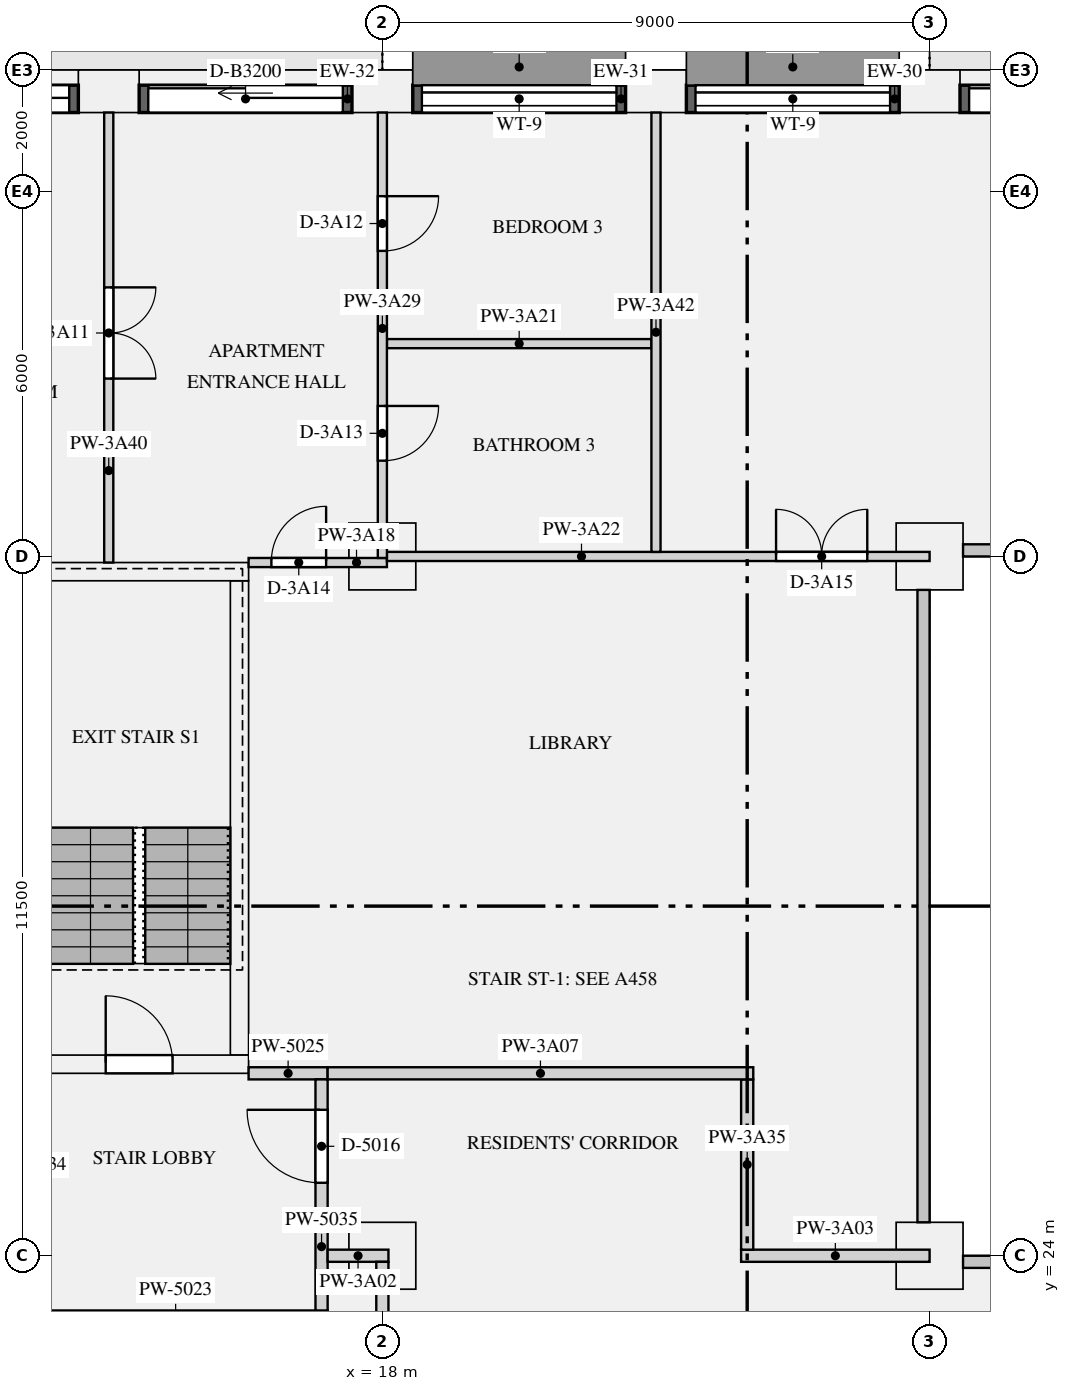
"""IFC4 building model, lengths in metres.
Left out: names, types, materials, properties, quantities, classifications, styles, units other than length and angle.
Written with IfcOpenShell. Run it as: python <this file> out.ifc"""

import sys

from ifc_helpers import new_model, si_unit, direction, frame, frame_2d, origin, origin_2d, place, context, subcontext, project, spatial, rectangle, extrude, element, fill, save


model = new_model("IFC4")
c1 = context("Model", 3, precision=1e-05, world=origin(), true_north=direction((0.0, 1.0)))
c2 = subcontext(c1, "Body", "Model", "MODEL_VIEW")
j1 = project(units=[si_unit("LENGTHUNIT", "METRE"), si_unit("PLANEANGLEUNIT", "RADIAN")], contexts=[c1])
p1 = place(None, origin())
s1 = spatial("IfcSite", under=j1, at=p1, CompositionType="ELEMENT")
p2 = place(p1, origin())
s2 = spatial("IfcBuilding", under=s1, at=p2, CompositionType="ELEMENT")
p3 = place(p2, frame((0.0, 0.0, 144.45)))
s3 = spatial("IfcBuildingStorey", under=s2, at=p3, CompositionType="ELEMENT", Elevation=144.45)
for number, where, z_axis, x_axis in (
    (1, (27.0, 43.15, 0.0), (0.0, 0.0, 1.0), (-1.0, 0.0, 0.0)),
    (2, (22.5, 43.15, 0.0), (0.0, 0.0, 1.0), (-1.0, 0.0, 0.0)),
    (3, (18.0, 43.15, 0.0), (0.0, 0.0, 1.0), (-1.0, 0.0, 0.0)),
    (4, (13.5, 43.15, 0.0), (0.0, 0.0, 1.0), (-1.0, 0.0, 0.0)),
):
    element("IfcColumn", number, at=place(p3, frame(where, z_axis=z_axis, x_axis=x_axis)), inside=s3, PredefinedType="USERDEFINED", context=c2, shape_type="SweptSolid", body=[
        extrude(rectangle(XDim=1.0, YDim=0.7, at=origin_2d()), origin(), (0.0, 0.0, 1.0), 3.15),
    ])
for number, where, z_axis, x_axis in (
    (5, (18.0, 24.0, 0.0), (0.0, 0.0, 1.0), (1.0, 0.0, 0.0)),
    (6, (27.0, 24.0, 0.0), (0.0, 0.0, 1.0), (1.0, 0.0, 0.0)),
    (7, (18.0, 35.5, 0.0), (0.0, 0.0, 1.0), (1.0, 0.0, 0.0)),
    (8, (27.0, 35.5, 0.0), (0.0, 0.0, 1.0), (1.0, 0.0, 0.0)),
):
    element("IfcColumn", number, at=place(p3, frame(where, z_axis=z_axis, x_axis=x_axis)), inside=s3, PredefinedType="COLUMN", context=c2, shape_type="SweptSolid", body=[
        extrude(rectangle(XDim=1.1, YDim=1.1, at=origin_2d()), origin(), (0.0, 0.0, 1.0), 3.15),
    ])
p4 = place(p3, frame((12.2, 27.15, 0.0), z_axis=(0.0, 0.0, 1.0), x_axis=(1.0, 0.0, 0.0)))
e9 = element("IfcWall", 9, at=p4, inside=s3, PredefinedType="SHEAR", context=c2, shape_type="SweptSolid", body=[
    extrude(rectangle(XDim=3.6, YDim=0.3, at=frame_2d((1.8, 0.0))), origin(), (0.0, 0.0, 1.0), 3.15),
])
p5 = place(p4, frame((1.25, 0.0, 0.0)))
e10 = element("IfcOpeningElement", 10, at=p5, cuts=e9, PredefinedType="OPENING", context=c2, shape_type="SweptSolid", body=[
    extrude(rectangle(XDim=1.1, YDim=2.1, at=frame_2d((0.55, 1.05))), frame((0.0, 0.16, 0.0), z_axis=(0.0, -1.0, 0.0), x_axis=(1.0, 0.0, 0.0)), (0.0, 0.0, 1.0), 0.32),
])
p6 = place(p3, frame((12.2, 35.25, 0.0), z_axis=(0.0, 0.0, 1.0), x_axis=(1.0, 0.0, 0.0)))
e11 = element("IfcWall", 11, at=p6, inside=s3, PredefinedType="SHEAR", context=c2, shape_type="SweptSolid", body=[
    extrude(rectangle(XDim=3.6, YDim=0.3, at=frame_2d((1.8, 0.0))), origin(), (0.0, 0.0, 1.0), 3.15),
])
p7 = place(p3, frame((15.65, 27.3, 0.0), z_axis=(0.0, 0.0, 1.0), x_axis=(0.0, 1.0, 0.0)))
e12 = element("IfcWall", 12, at=p7, inside=s3, PredefinedType="SHEAR", context=c2, shape_type="SweptSolid", body=[
    extrude(rectangle(XDim=7.8, YDim=0.3, at=frame_2d((3.9, 0.0))), origin(), (0.0, 0.0, 1.0), 3.15),
])
p8 = place(p3, frame((31.0, 43.025, 0.0), z_axis=(0.0, 0.0, 1.0), x_axis=(-1.0, 0.0, 0.0)))
e13 = element("IfcWall", 13, at=p8, inside=s3, PredefinedType="SOLIDWALL", context=c2, shape_type="SweptSolid", body=[
    extrude(rectangle(XDim=3.5, YDim=0.45, at=frame_2d((1.75, 0.0))), origin(), (0.0, 0.0, 1.0), 2.83),
])
p9 = place(p8, frame((0.15, 0.0, 0.0)))
e14 = element("IfcOpeningElement", 14, at=p9, cuts=e13, PredefinedType="OPENING", context=c2, shape_type="SweptSolid", body=[
    extrude(rectangle(XDim=3.2, YDim=2.3, at=frame_2d((1.6, 1.15))), frame((0.0, 0.235, 0.0), z_axis=(0.0, -1.0, 0.0), x_axis=(1.0, 0.0, 0.0)), (0.0, 0.0, 1.0), 0.47),
])
p10 = place(p3, frame((26.5, 43.025, 0.9), z_axis=(0.0, 0.0, 1.0), x_axis=(-1.0, 0.0, 0.0)))
e15 = element("IfcWall", 15, at=p10, inside=s3, PredefinedType="SOLIDWALL", context=c2, shape_type="SweptSolid", body=[
    extrude(rectangle(XDim=3.5, YDim=0.45, at=frame_2d((1.75, 0.0))), origin(), (0.0, 0.0, 1.0), 1.93),
])
p11 = place(p10, frame((0.15, 0.0, 0.15)))
e16 = element("IfcOpeningElement", 16, at=p11, cuts=e15, PredefinedType="OPENING", context=c2, shape_type="SweptSolid", body=[
    extrude(rectangle(XDim=3.2, YDim=1.5, at=frame_2d((1.6, 0.75))), frame((0.0, 0.235, 0.0), z_axis=(0.0, -1.0, 0.0), x_axis=(1.0, 0.0, 0.0)), (0.0, 0.0, 1.0), 0.47),
])
p12 = place(p3, frame((22.0, 43.025, 0.9), z_axis=(0.0, 0.0, 1.0), x_axis=(-1.0, 0.0, 0.0)))
e17 = element("IfcWall", 17, at=p12, inside=s3, PredefinedType="SOLIDWALL", context=c2, shape_type="SweptSolid", body=[
    extrude(rectangle(XDim=3.5, YDim=0.45, at=frame_2d((1.75, 0.0))), origin(), (0.0, 0.0, 1.0), 1.93),
])
p13 = place(p12, frame((0.15, 0.0, 0.15)))
e18 = element("IfcOpeningElement", 18, at=p13, cuts=e17, PredefinedType="OPENING", context=c2, shape_type="SweptSolid", body=[
    extrude(rectangle(XDim=3.2, YDim=1.5, at=frame_2d((1.6, 0.75))), frame((0.0, 0.235, 0.0), z_axis=(0.0, -1.0, 0.0), x_axis=(1.0, 0.0, 0.0)), (0.0, 0.0, 1.0), 0.47),
])
p14 = place(p3, frame((17.5, 43.025, 0.0), z_axis=(0.0, 0.0, 1.0), x_axis=(-1.0, 0.0, 0.0)))
e19 = element("IfcWall", 19, at=p14, inside=s3, PredefinedType="SOLIDWALL", context=c2, shape_type="SweptSolid", body=[
    extrude(rectangle(XDim=3.5, YDim=0.45, at=frame_2d((1.75, 0.0))), origin(), (0.0, 0.0, 1.0), 2.83),
])
p15 = place(p14, frame((0.15, 0.0, 0.0)))
e20 = element("IfcOpeningElement", 20, at=p15, cuts=e19, PredefinedType="OPENING", context=c2, shape_type="SweptSolid", body=[
    extrude(rectangle(XDim=3.2, YDim=2.3, at=frame_2d((1.6, 1.15))), frame((0.0, 0.235, 0.0), z_axis=(0.0, -1.0, 0.0), x_axis=(1.0, 0.0, 0.0)), (0.0, 0.0, 1.0), 0.47),
])
p16 = place(p3, frame((13.0, 43.025, 0.0), z_axis=(0.0, 0.0, 1.0), x_axis=(-1.0, 0.0, 0.0)))
e21 = element("IfcWall", 21, at=p16, inside=s3, PredefinedType="SOLIDWALL", context=c2, shape_type="SweptSolid", body=[
    extrude(rectangle(XDim=3.3, YDim=0.45, at=frame_2d((1.65, 0.0))), origin(), (0.0, 0.0, 1.0), 2.83),
])
p17 = place(p16, frame((0.15, 0.0, 0.0)))
e22 = element("IfcOpeningElement", 22, at=p17, cuts=e21, PredefinedType="OPENING", context=c2, shape_type="SweptSolid", body=[
    extrude(rectangle(XDim=3.0, YDim=2.3, at=frame_2d((1.5, 1.15))), frame((0.0, 0.235, 0.0), z_axis=(0.0, -1.0, 0.0), x_axis=(1.0, 0.0, 0.0)), (0.0, 0.0, 1.0), 0.47),
])
p18 = place(p3, frame((15.8, 27.0, 0.0), z_axis=(0.0, 0.0, 1.0), x_axis=(1.0, 0.0, 0.0)))
e23 = element("IfcWall", 23, at=p18, inside=s3, PredefinedType="PARTITIONING", context=c2, shape_type="SweptSolid", body=[
    extrude(rectangle(XDim=1.3, YDim=0.2, at=frame_2d((0.65, 0.0))), origin(), (0.0, 0.0, 1.0), 2.83),
])
p19 = place(p3, frame((17.0, 23.1, 0.0), z_axis=(0.0, 0.0, 1.0), x_axis=(0.0, 1.0, 0.0)))
e24 = element("IfcWall", 24, at=p19, inside=s3, PredefinedType="PARTITIONING", context=c2, shape_type="SweptSolid", body=[
    extrude(rectangle(XDim=3.8, YDim=0.2, at=frame_2d((1.9, 0.0))), origin(), (0.0, 0.0, 1.0), 2.83),
])
p20 = place(p19, frame((2.1, 0.0, 0.0)))
e25 = element("IfcOpeningElement", 25, at=p20, cuts=e24, PredefinedType="OPENING", context=c2, shape_type="SweptSolid", body=[
    extrude(rectangle(XDim=1.2, YDim=2.1, at=frame_2d((0.6, 1.05))), frame((0.0, 0.11, 0.0), z_axis=(0.0, -1.0, 0.0), x_axis=(1.0, 0.0, 0.0)), (0.0, 0.0, 1.0), 0.22),
])
p21 = place(p3, frame((17.1, 24.0, 0.0), z_axis=(0.0, 0.0, 1.0), x_axis=(1.0, 0.0, 0.0)))
e26 = element("IfcWall", 26, at=p21, inside=s3, PredefinedType="PARTITIONING", context=c2, shape_type="SweptSolid", body=[
    extrude(rectangle(XDim=1.0, YDim=0.2, at=frame_2d((0.5, 0.0))), origin(), (0.0, 0.0, 1.0), 2.83),
])
p22 = place(p3, frame((23.9, 24.0, 0.0), z_axis=(0.0, 0.0, 1.0), x_axis=(1.0, 0.0, 0.0)))
e27 = element("IfcWall", 27, at=p22, inside=s3, PredefinedType="PARTITIONING", context=c2, shape_type="SweptSolid", body=[
    extrude(rectangle(XDim=3.1, YDim=0.2, at=frame_2d((1.55, 0.0))), origin(), (0.0, 0.0, 1.0), 2.83),
])
p23 = place(p3, frame((17.1, 27.0, 0.0), z_axis=(0.0, 0.0, 1.0), x_axis=(1.0, 0.0, 0.0)))
e28 = element("IfcWall", 28, at=p23, inside=s3, PredefinedType="PARTITIONING", context=c2, shape_type="SweptSolid", body=[
    extrude(rectangle(XDim=7.0, YDim=0.2, at=frame_2d((3.5, 0.0))), origin(), (0.0, 0.0, 1.0), 2.83),
])
p24 = place(p3, frame((15.8, 35.4, 0.0), z_axis=(0.0, 0.0, 1.0), x_axis=(1.0, 0.0, 0.0)))
e29 = element("IfcWall", 29, at=p24, inside=s3, PredefinedType="PARTITIONING", context=c2, shape_type="SweptSolid", body=[
    extrude(rectangle(XDim=2.275, YDim=0.15, at=frame_2d((1.137, 0.0))), origin(), (0.0, 0.0, 1.0), 2.83),
])
p25 = place(p24, frame((0.375, 0.0, 0.0)))
e30 = element("IfcOpeningElement", 30, at=p25, cuts=e29, PredefinedType="OPENING", context=c2, shape_type="SweptSolid", body=[
    extrude(rectangle(XDim=0.9, YDim=2.1, at=frame_2d((0.45, 1.05))), frame((0.0, 0.085, 0.0), z_axis=(0.0, -1.0, 0.0), x_axis=(1.0, 0.0, 0.0)), (0.0, 0.0, 1.0), 0.17),
])
p26 = place(p3, frame((18.075, 39.0, 0.0), z_axis=(0.0, 0.0, 1.0), x_axis=(1.0, 0.0, 0.0)))
e31 = element("IfcWall", 31, at=p26, inside=s3, PredefinedType="PARTITIONING", context=c2, shape_type="SweptSolid", body=[
    extrude(rectangle(XDim=4.35, YDim=0.15, at=frame_2d((2.175, 0.0))), origin(), (0.0, 0.0, 1.0), 2.83),
])
p27 = place(p3, frame((18.075, 35.5, 0.0), z_axis=(0.0, 0.0, 1.0), x_axis=(1.0, 0.0, 0.0)))
e32 = element("IfcWall", 32, at=p27, inside=s3, PredefinedType="PARTITIONING", context=c2, shape_type="SweptSolid", body=[
    extrude(rectangle(XDim=8.925, YDim=0.15, at=frame_2d((4.462, 0.0))), origin(), (0.0, 0.0, 1.0), 2.83),
])
p28 = place(p27, frame((6.4, 0.0, 0.0)))
e33 = element("IfcOpeningElement", 33, at=p28, cuts=e32, PredefinedType="OPENING", context=c2, shape_type="SweptSolid", body=[
    extrude(rectangle(XDim=1.5, YDim=2.1, at=frame_2d((0.75, 1.05))), frame((0.0, 0.085, 0.0), z_axis=(0.0, -1.0, 0.0), x_axis=(1.0, 0.0, 0.0)), (0.0, 0.0, 1.0), 0.17),
])
p29 = place(p3, frame((18.0, 35.475, 0.0), z_axis=(0.0, 0.0, 1.0), x_axis=(0.0, 1.0, 0.0)))
e34 = element("IfcWall", 34, at=p29, inside=s3, PredefinedType="PARTITIONING", context=c2, shape_type="SweptSolid", body=[
    extrude(rectangle(XDim=7.325, YDim=0.15, at=frame_2d((3.663, 0.0))), origin(), (0.0, 0.0, 1.0), 2.83),
])
p30 = place(p29, frame((5.05, 0.0, 0.0)))
e35 = element("IfcOpeningElement", 35, at=p30, cuts=e34, PredefinedType="OPENING", context=c2, shape_type="SweptSolid", body=[
    extrude(rectangle(XDim=0.9, YDim=2.1, at=frame_2d((0.45, 1.05))), frame((0.0, 0.085, 0.0), z_axis=(0.0, -1.0, 0.0), x_axis=(1.0, 0.0, 0.0)), (0.0, 0.0, 1.0), 0.17),
])
p31 = place(p29, frame((1.6, 0.0, 0.0)))
e36 = element("IfcOpeningElement", 36, at=p31, cuts=e34, PredefinedType="OPENING", context=c2, shape_type="SweptSolid", body=[
    extrude(rectangle(XDim=0.9, YDim=2.1, at=frame_2d((0.45, 1.05))), frame((0.0, 0.085, 0.0), z_axis=(0.0, -1.0, 0.0), x_axis=(1.0, 0.0, 0.0)), (0.0, 0.0, 1.0), 0.17),
])
p32 = place(p3, frame((18.0, 16.1, 0.0), z_axis=(0.0, 0.0, 1.0), x_axis=(0.0, 1.0, 0.0)))
e37 = element("IfcWall", 37, at=p32, inside=s3, PredefinedType="PARTITIONING", context=c2, shape_type="SweptSolid", body=[
    extrude(rectangle(XDim=7.8, YDim=0.2, at=frame_2d((3.9, 0.0))), origin(), (0.0, 0.0, 1.0), 2.83),
])
p33 = place(p32, frame((1.85, 0.0, 0.0)))
e38 = element("IfcOpeningElement", 38, at=p33, cuts=e37, PredefinedType="OPENING", context=c2, shape_type="SweptSolid", body=[
    extrude(rectangle(XDim=1.1, YDim=2.1, at=frame_2d((0.55, 1.05))), frame((0.0, 0.11, 0.0), z_axis=(0.0, -1.0, 0.0), x_axis=(1.0, 0.0, 0.0)), (0.0, 0.0, 1.0), 0.22),
])
p34 = place(p3, frame((24.0, 24.1, 0.0), z_axis=(0.0, 0.0, 1.0), x_axis=(0.0, 1.0, 0.0)))
e39 = element("IfcWall", 39, at=p34, inside=s3, PredefinedType="PARTITIONING", context=c2, shape_type="SweptSolid", body=[
    extrude(rectangle(XDim=2.8, YDim=0.2, at=frame_2d((1.4, 0.0))), origin(), (0.0, 0.0, 1.0), 2.83),
])
p35 = place(p3, frame((13.5, 35.4, 0.0), z_axis=(0.0, 0.0, 1.0), x_axis=(0.0, 1.0, 0.0)))
e40 = element("IfcWall", 40, at=p35, inside=s3, PredefinedType="PARTITIONING", context=c2, shape_type="SweptSolid", body=[
    extrude(rectangle(XDim=7.4, YDim=0.15, at=frame_2d((3.7, 0.0))), origin(), (0.0, 0.0, 1.0), 2.83),
])
p36 = place(p35, frame((3.025, 0.0, 0.0)))
e41 = element("IfcOpeningElement", 41, at=p36, cuts=e40, PredefinedType="OPENING", context=c2, shape_type="SweptSolid", body=[
    extrude(rectangle(XDim=1.5, YDim=2.1, at=frame_2d((0.75, 1.05))), frame((0.0, 0.085, 0.0), z_axis=(0.0, -1.0, 0.0), x_axis=(1.0, 0.0, 0.0)), (0.0, 0.0, 1.0), 0.17),
])
p37 = place(p3, frame((22.5, 35.575, 0.0), z_axis=(0.0, 0.0, 1.0), x_axis=(0.0, 1.0, 0.0)))
e42 = element("IfcWall", 42, at=p37, inside=s3, PredefinedType="PARTITIONING", context=c2, shape_type="SweptSolid", body=[
    extrude(rectangle(XDim=7.225, YDim=0.15, at=frame_2d((3.613, 0.0))), origin(), (0.0, 0.0, 1.0), 2.83),
])
p38 = place(p9, origin())
e43 = element("IfcDoor", 43, at=p38, inside=s3, OperationType="SLIDING_TO_LEFT", PredefinedType="DOOR", context=c2, shape_type="SweptSolid", body=[
    extrude(rectangle(XDim=3.2, YDim=2.3, at=frame_2d((1.6, 1.15))), frame((0.0, -0.07, 0.0), z_axis=(0.0, -1.0, 0.0), x_axis=(1.0, 0.0, 0.0)), (0.0, 0.0, 1.0), 0.05),
])
fill(e14, e43)
p39 = place(p11, origin())
e44 = element("IfcWindow", 44, at=p39, inside=s3, PartitioningType="SINGLE_PANEL", PredefinedType="WINDOW", context=c2, shape_type="SweptSolid", body=[
    extrude(rectangle(XDim=3.2, YDim=1.5, at=frame_2d((1.6, 0.75))), frame((0.0, -0.065, 0.0), z_axis=(0.0, -1.0, 0.0), x_axis=(1.0, 0.0, 0.0)), (0.0, 0.0, 1.0), 0.06),
])
fill(e16, e44)
p40 = place(p13, origin())
e45 = element("IfcWindow", 45, at=p40, inside=s3, PartitioningType="SINGLE_PANEL", PredefinedType="WINDOW", context=c2, shape_type="SweptSolid", body=[
    extrude(rectangle(XDim=3.2, YDim=1.5, at=frame_2d((1.6, 0.75))), frame((0.0, -0.065, 0.0), z_axis=(0.0, -1.0, 0.0), x_axis=(1.0, 0.0, 0.0)), (0.0, 0.0, 1.0), 0.06),
])
fill(e18, e45)
p41 = place(p15, origin())
e46 = element("IfcDoor", 46, at=p41, inside=s3, OperationType="SLIDING_TO_LEFT", PredefinedType="DOOR", context=c2, shape_type="SweptSolid", body=[
    extrude(rectangle(XDim=3.2, YDim=2.3, at=frame_2d((1.6, 1.15))), frame((0.0, -0.07, 0.0), z_axis=(0.0, -1.0, 0.0), x_axis=(1.0, 0.0, 0.0)), (0.0, 0.0, 1.0), 0.05),
])
fill(e20, e46)
p42 = place(p17, origin())
e47 = element("IfcDoor", 47, at=p42, inside=s3, OperationType="SLIDING_TO_LEFT", PredefinedType="DOOR", context=c2, shape_type="SweptSolid", body=[
    extrude(rectangle(XDim=3.0, YDim=2.3, at=frame_2d((1.5, 1.15))), frame((0.0, -0.07, 0.0), z_axis=(0.0, -1.0, 0.0), x_axis=(1.0, 0.0, 0.0)), (0.0, 0.0, 1.0), 0.05),
])
fill(e22, e47)
p43 = place(p5, origin())
e48 = element("IfcDoor", 48, at=p43, inside=s3, OperationType="SINGLE_SWING_LEFT", PredefinedType="DOOR", context=c2, shape_type="SweptSolid", body=[
    extrude(rectangle(XDim=1.1, YDim=2.1, at=frame_2d((0.55, 1.05))), frame((0.0, 0.025, 0.0), z_axis=(0.0, -1.0, 0.0), x_axis=(1.0, 0.0, 0.0)), (0.0, 0.0, 1.0), 0.05),
])
fill(e10, e48)
p44 = place(p20, origin())
e49 = element("IfcDoor", 49, at=p44, inside=s3, OperationType="SINGLE_SWING_RIGHT", PredefinedType="DOOR", context=c2, shape_type="SweptSolid", body=[
    extrude(rectangle(XDim=1.2, YDim=2.1, at=frame_2d((0.6, 1.05))), frame((0.0, 0.025, 0.0), z_axis=(0.0, -1.0, 0.0), x_axis=(1.0, 0.0, 0.0)), (0.0, 0.0, 1.0), 0.05),
])
fill(e25, e49)
p45 = place(p36, frame((1.5, 0.0, 0.0), z_axis=(0.0, 0.0, 1.0), x_axis=(-1.0, 0.0, 0.0)))
e50 = element("IfcDoor", 50, at=p45, inside=s3, OperationType="DOUBLE_DOOR_SINGLE_SWING", PredefinedType="DOOR", context=c2, shape_type="SweptSolid", body=[
    extrude(rectangle(XDim=1.5, YDim=2.1, at=frame_2d((0.75, 1.05))), frame((0.0, 0.025, 0.0), z_axis=(0.0, -1.0, 0.0), x_axis=(1.0, 0.0, 0.0)), (0.0, 0.0, 1.0), 0.05),
])
fill(e41, e50)
p46 = place(p30, frame((0.9, 0.0, 0.0), z_axis=(0.0, 0.0, 1.0), x_axis=(-1.0, 0.0, 0.0)))
e51 = element("IfcDoor", 51, at=p46, inside=s3, OperationType="SINGLE_SWING_LEFT", PredefinedType="DOOR", context=c2, shape_type="SweptSolid", body=[
    extrude(rectangle(XDim=0.9, YDim=2.1, at=frame_2d((0.45, 1.05))), frame((0.0, 0.025, 0.0), z_axis=(0.0, -1.0, 0.0), x_axis=(1.0, 0.0, 0.0)), (0.0, 0.0, 1.0), 0.05),
])
fill(e35, e51)
p47 = place(p31, frame((0.9, 0.0, 0.0), z_axis=(0.0, 0.0, 1.0), x_axis=(-1.0, 0.0, 0.0)))
e52 = element("IfcDoor", 52, at=p47, inside=s3, OperationType="SINGLE_SWING_LEFT", PredefinedType="DOOR", context=c2, shape_type="SweptSolid", body=[
    extrude(rectangle(XDim=0.9, YDim=2.1, at=frame_2d((0.45, 1.05))), frame((0.0, 0.025, 0.0), z_axis=(0.0, -1.0, 0.0), x_axis=(1.0, 0.0, 0.0)), (0.0, 0.0, 1.0), 0.05),
])
fill(e36, e52)
p48 = place(p25, origin())
e53 = element("IfcDoor", 53, at=p48, inside=s3, OperationType="SINGLE_SWING_RIGHT", PredefinedType="DOOR", context=c2, shape_type="SweptSolid", body=[
    extrude(rectangle(XDim=0.9, YDim=2.1, at=frame_2d((0.45, 1.05))), frame((0.0, 0.025, 0.0), z_axis=(0.0, -1.0, 0.0), x_axis=(1.0, 0.0, 0.0)), (0.0, 0.0, 1.0), 0.05),
])
fill(e30, e53)
p49 = place(p28, origin())
e54 = element("IfcDoor", 54, at=p49, inside=s3, OperationType="DOUBLE_DOOR_SINGLE_SWING", PredefinedType="DOOR", context=c2, shape_type="SweptSolid", body=[
    extrude(rectangle(XDim=1.5, YDim=2.1, at=frame_2d((0.75, 1.05))), frame((0.0, 0.025, 0.0), z_axis=(0.0, -1.0, 0.0), x_axis=(1.0, 0.0, 0.0)), (0.0, 0.0, 1.0), 0.05),
])
fill(e33, e54)
save(model, sys.argv[1])
